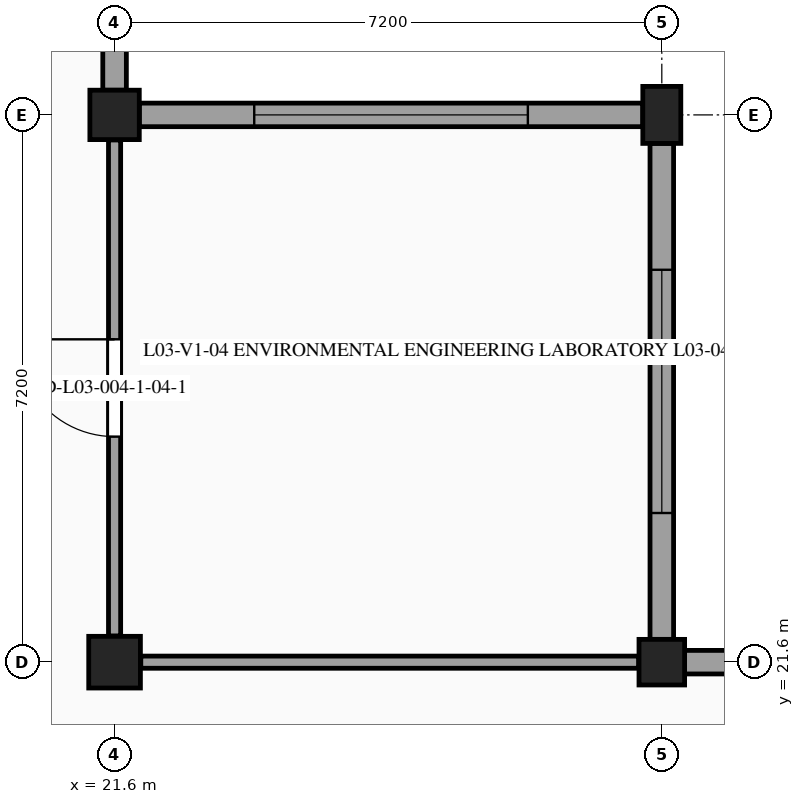
"""IFC4 building model, lengths in metres.
Left out: names, types, materials, properties, quantities, classifications, styles, units other than length and angle.
Written with IfcOpenShell. Run it as: python <this file> out.ifc"""

import sys

from ifc_helpers import new_model, si_unit, direction, frame, frame_2d, origin, origin_2d, place, context, subcontext, project, spatial, rectangle, extrude, element, fill, save


model = new_model("IFC4")
c1 = context("Model", 3, precision=1e-05, world=origin(), true_north=direction((0.0, 1.0)))
c2 = subcontext(c1, "Body", "Model", "MODEL_VIEW")
j1 = project(units=[si_unit("LENGTHUNIT", "METRE"), si_unit("PLANEANGLEUNIT", "RADIAN")], contexts=[c1])
p1 = place(None, origin())
s1 = spatial("IfcSite", under=j1, at=p1, CompositionType="ELEMENT")
p2 = place(p1, origin())
s2 = spatial("IfcBuilding", under=s1, at=p2, CompositionType="ELEMENT")
p3 = place(p2, frame((0.0, 0.0, 14.4)))
s3 = spatial("IfcBuildingStorey", under=s2, at=p3, CompositionType="ELEMENT", Elevation=14.4)
p4 = place(p3, frame((21.6, 21.6, 0.0), z_axis=(0.0, 0.0, 1.0), x_axis=(1.0, 0.0, 0.0)))
e1 = element("IfcColumn", 1, at=p4, inside=s3, PredefinedType="COLUMN", context=c2, shape_type="SweptSolid", body=[
    extrude(rectangle(XDim=0.68, YDim=0.68, at=origin_2d()), origin(), (0.0, 0.0, 1.0), 4.2),
])
p5 = place(p3, frame((21.6, 28.8, 0.0), z_axis=(0.0, 0.0, 1.0), x_axis=(1.0, 0.0, 0.0)))
e2 = element("IfcColumn", 2, at=p5, inside=s3, PredefinedType="COLUMN", context=c2, shape_type="SweptSolid", body=[
    extrude(rectangle(XDim=0.65, YDim=0.65, at=origin_2d()), origin(), (0.0, 0.0, 1.0), 4.2),
])
p6 = place(p3, frame((28.8, 21.6, 0.0), z_axis=(0.0, 0.0, 1.0), x_axis=(1.0, 0.0, 0.0)))
e3 = element("IfcColumn", 3, at=p6, inside=s3, PredefinedType="COLUMN", context=c2, shape_type="SweptSolid", body=[
    extrude(rectangle(XDim=0.6, YDim=0.6, at=origin_2d()), origin(), (0.0, 0.0, 1.0), 4.2),
])
p7 = place(p3, frame((28.8, 28.8, 0.0), z_axis=(0.0, 0.0, 1.0), x_axis=(1.0, 0.0, 0.0)))
e4 = element("IfcColumn", 4, at=p7, inside=s3, PredefinedType="COLUMN", context=c2, shape_type="SweptSolid", body=[
    extrude(rectangle(XDim=0.5, YDim=0.75, at=origin_2d()), origin(), (0.0, 0.0, 1.0), 4.2),
])
p8 = place(p3, frame((21.6, 35.69, 0.0), z_axis=(0.0, 0.0, 1.0), x_axis=(0.0, -1.0, 0.0)))
e5 = element("IfcWall", 5, at=p8, inside=s3, PredefinedType="STANDARD", context=c2, shape_type="SweptSolid", body=[
    extrude(rectangle(XDim=6.565, YDim=0.31, at=frame_2d((3.282, 0.0))), origin(), (0.0, 0.0, 1.0), 3.135),
])
p9 = place(p8, frame((1.183, 0.0, 0.98)))
e6 = element("IfcOpeningElement", 6, at=p9, cuts=e5, PredefinedType="OPENING", context=c2, shape_type="SweptSolid", body=[
    extrude(rectangle(XDim=4.2, YDim=1.5, at=frame_2d((2.1, 0.75))), frame((0.0, 0.165, 0.0), z_axis=(0.0, -1.0, 0.0), x_axis=(1.0, 0.0, 0.0)), (0.0, 0.0, 1.0), 0.33),
])
p10 = place(p3, frame((21.925, 28.8, 0.0), z_axis=(0.0, 0.0, 1.0), x_axis=(1.0, 0.0, 0.0)))
e7 = element("IfcWall", 7, at=p10, inside=s3, PredefinedType="STANDARD", context=c2, shape_type="SweptSolid", body=[
    extrude(rectangle(XDim=6.625, YDim=0.31, at=frame_2d((3.312, 0.0))), origin(), (0.0, 0.0, 1.0), 3.185),
])
p11 = place(p10, frame((1.512, 0.0, 0.98)))
e8 = element("IfcOpeningElement", 8, at=p11, cuts=e7, PredefinedType="OPENING", context=c2, shape_type="SweptSolid", body=[
    extrude(rectangle(XDim=3.6, YDim=1.5, at=frame_2d((1.8, 0.75))), frame((0.0, 0.165, 0.0), z_axis=(0.0, -1.0, 0.0), x_axis=(1.0, 0.0, 0.0)), (0.0, 0.0, 1.0), 0.33),
])
p12 = place(p3, frame((28.8, 28.425, 0.0), z_axis=(0.0, 0.0, 1.0), x_axis=(0.0, -1.0, 0.0)))
e9 = element("IfcWall", 9, at=p12, inside=s3, PredefinedType="STANDARD", context=c2, shape_type="SweptSolid", body=[
    extrude(rectangle(XDim=6.525, YDim=0.31, at=frame_2d((3.263, 0.0))), origin(), (0.0, 0.0, 1.0), 3.135),
])
p13 = place(p12, frame((1.663, 0.0, 0.98)))
e10 = element("IfcOpeningElement", 10, at=p13, cuts=e9, PredefinedType="OPENING", context=c2, shape_type="SweptSolid", body=[
    extrude(rectangle(XDim=3.2, YDim=1.45, at=frame_2d((1.6, 0.725))), frame((0.0, 0.165, 0.0), z_axis=(0.0, -1.0, 0.0), x_axis=(1.0, 0.0, 0.0)), (0.0, 0.0, 1.0), 0.33),
])
p14 = place(p3, frame((29.1, 21.6, 0.0), z_axis=(0.0, 0.0, 1.0), x_axis=(1.0, 0.0, 0.0)))
e11 = element("IfcWall", 11, at=p14, inside=s3, PredefinedType="STANDARD", context=c2, shape_type="SweptSolid", body=[
    extrude(rectangle(XDim=6.56, YDim=0.31, at=frame_2d((3.28, 0.0))), origin(), (0.0, 0.0, 1.0), 3.185),
])
p15 = place(p14, frame((1.88, 0.0, 0.98)))
e12 = element("IfcOpeningElement", 12, at=p15, cuts=e11, PredefinedType="OPENING", context=c2, shape_type="SweptSolid", body=[
    extrude(rectangle(XDim=2.8, YDim=1.45, at=frame_2d((1.4, 0.725))), frame((0.0, 0.165, 0.0), z_axis=(0.0, -1.0, 0.0), x_axis=(1.0, 0.0, 0.0)), (0.0, 0.0, 1.0), 0.33),
])
p16 = place(p3, frame((21.6, 21.945, 0.0), z_axis=(0.0, 0.0, 1.0), x_axis=(0.0, 1.0, 0.0)))
e13 = element("IfcWall", 13, at=p16, inside=s3, PredefinedType="PARTITIONING", context=c2, shape_type="SweptSolid", body=[
    extrude(rectangle(XDim=6.525, YDim=0.16, at=frame_2d((3.262, 0.0))), origin(), (0.0, 0.0, 1.0), 3.31),
])
p17 = place(p16, frame((2.623, 0.0, 0.0)))
e14 = element("IfcOpeningElement", 14, at=p17, cuts=e13, PredefinedType="OPENING", context=c2, shape_type="SweptSolid", body=[
    extrude(rectangle(XDim=1.28, YDim=2.24, at=frame_2d((0.64, 1.12))), frame((0.0, 0.09, 0.0), z_axis=(0.0, -1.0, 0.0), x_axis=(1.0, 0.0, 0.0)), (0.0, 0.0, 1.0), 0.18),
])
p18 = place(p3, frame((21.945, 21.6, 0.0), z_axis=(0.0, 0.0, 1.0), x_axis=(1.0, 0.0, 0.0)))
e15 = element("IfcWall", 15, at=p18, inside=s3, PredefinedType="PARTITIONING", context=c2, shape_type="SweptSolid", body=[
    extrude(rectangle(XDim=6.55, YDim=0.16, at=frame_2d((3.275, 0.0))), origin(), (0.0, 0.0, 1.0), 3.28),
])
p19 = place(p11, origin())
e16 = element("IfcWindow", 16, at=p19, inside=s3, PartitioningType="SINGLE_PANEL", PredefinedType="WINDOW", context=c2, shape_type="SweptSolid", body=[
    extrude(rectangle(XDim=3.6, YDim=1.5, at=frame_2d((1.8, 0.75))), frame((0.0, -0.03, 0.0), z_axis=(0.0, -1.0, 0.0), x_axis=(1.0, 0.0, 0.0)), (0.0, 0.0, 1.0), 0.06),
])
fill(e8, e16)
p20 = place(p13, origin())
e17 = element("IfcWindow", 17, at=p20, inside=s3, PartitioningType="SINGLE_PANEL", PredefinedType="WINDOW", context=c2, shape_type="SweptSolid", body=[
    extrude(rectangle(XDim=3.2, YDim=1.45, at=frame_2d((1.6, 0.725))), frame((0.0, -0.03, 0.0), z_axis=(0.0, -1.0, 0.0), x_axis=(1.0, 0.0, 0.0)), (0.0, 0.0, 1.0), 0.06),
])
fill(e10, e17)
p21 = place(p17, origin())
e18 = element("IfcDoor", 18, at=p21, inside=s3, OperationType="SINGLE_SWING_RIGHT", PredefinedType="DOOR", context=c2, shape_type="SweptSolid", body=[
    extrude(rectangle(XDim=1.28, YDim=2.24, at=frame_2d((0.64, 1.12))), frame((0.0, 0.025, 0.0), z_axis=(0.0, -1.0, 0.0), x_axis=(1.0, 0.0, 0.0)), (0.0, 0.0, 1.0), 0.05),
])
fill(e14, e18)
save(model, sys.argv[1])
